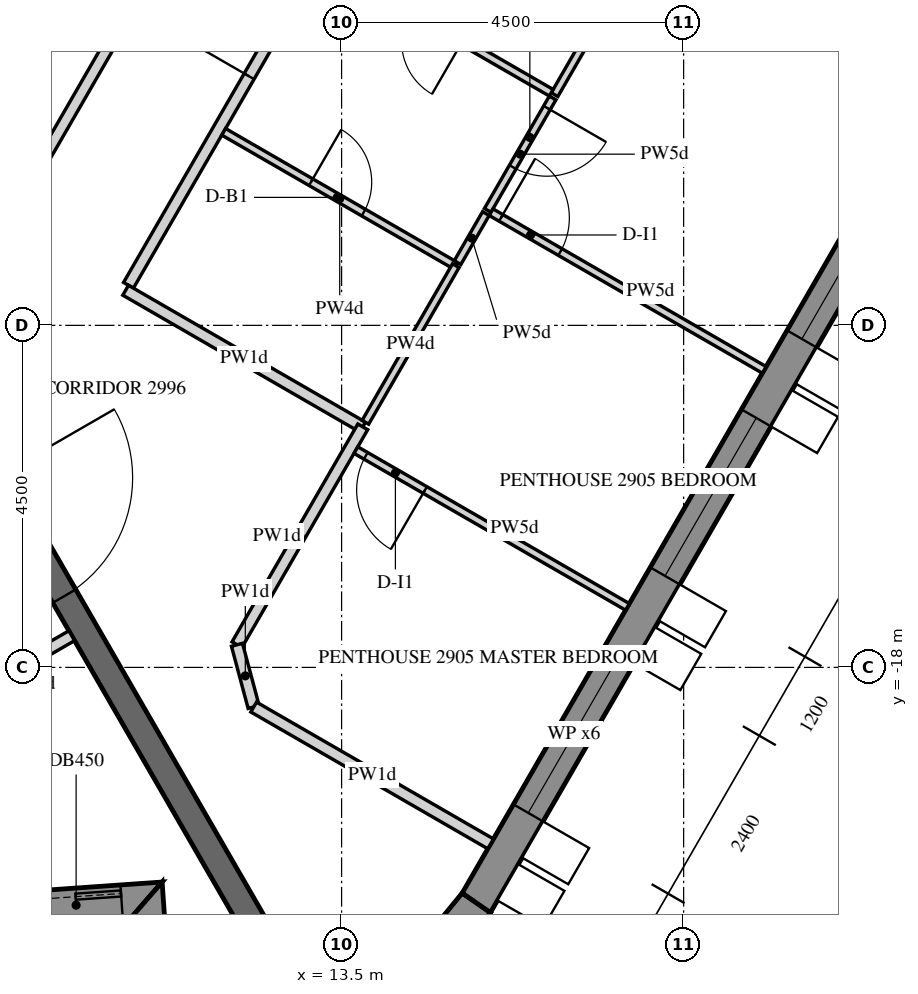
"""IFC4 building model, lengths in metres.
Left out: names, types, materials, properties, quantities, classifications, styles, units other than length and angle.
Written with IfcOpenShell. Run it as: python <this file> out.ifc"""

import sys

from ifc_helpers import new_model, si_unit, direction, frame, frame_2d, origin, place, context, subcontext, project, spatial, polyline, rectangle, outline, extrude, element, fill, save


model = new_model("IFC4")
c1 = context("Model", 3, precision=1e-05, world=origin(), true_north=direction((0.0, 1.0)))
c2 = subcontext(c1, "Body", "Model", "MODEL_VIEW")
j1 = project(units=[si_unit("LENGTHUNIT", "METRE"), si_unit("PLANEANGLEUNIT", "RADIAN")], contexts=[c1])
p1 = place(None, origin())
s1 = spatial("IfcSite", under=j1, at=p1, CompositionType="ELEMENT")
p2 = place(p1, origin())
s2 = spatial("IfcBuilding", under=s1, at=p2, CompositionType="ELEMENT")
p3 = place(p2, frame((0.0, 0.0, 369.0)))
s3 = spatial("IfcBuildingStorey", under=s2, at=p3, CompositionType="ELEMENT", Elevation=369.0)
p4 = place(p3, frame((-9.751, -22.51, -0.15), z_axis=(0.0, 0.0, 1.0), x_axis=(0.997564460173, 0.06975061147, 0.0)))
e1 = element("IfcWall", 1, at=p4, inside=s3, PredefinedType="SOLIDWALL", context=c2, shape_type="SweptSolid", body=[
    extrude(outline(polyline([(0.225, -0.225), (20.507, -0.225), (20.957, 0.225), (-0.225, 0.225), (0.225, -0.225)])), origin(), (0.0, 0.0, 1.0), 3.9),
])
p5 = place(p4, frame((0.325, 0.0, 1.05)))
e2 = element("IfcOpeningElement", 2, at=p5, cuts=e1, PredefinedType="OPENING", context=c2, shape_type="SweptSolid", body=[
    extrude(rectangle(XDim=0.9, YDim=1.5, at=frame_2d((0.45, 0.75))), frame((0.0, 0.235, 0.0), z_axis=(0.0, -1.0, 0.0), x_axis=(1.0, 0.0, 0.0)), (0.0, 0.0, 1.0), 0.47),
])
p6 = place(p4, frame((1.525, 0.0, 0.15)))
e3 = element("IfcOpeningElement", 3, at=p6, cuts=e1, PredefinedType="OPENING", context=c2, shape_type="SweptSolid", body=[
    extrude(rectangle(XDim=1.2, YDim=2.4, at=frame_2d((0.6, 1.2))), frame((0.0, 0.235, 0.0), z_axis=(0.0, -1.0, 0.0), x_axis=(1.0, 0.0, 0.0)), (0.0, 0.0, 1.0), 0.47),
])
p7 = place(p4, frame((3.766, 0.0, 1.05)))
e4 = element("IfcOpeningElement", 4, at=p7, cuts=e1, PredefinedType="OPENING", context=c2, shape_type="SweptSolid", body=[
    extrude(rectangle(XDim=0.9, YDim=1.5, at=frame_2d((0.45, 0.75))), frame((0.0, 0.235, 0.0), z_axis=(0.0, -1.0, 0.0), x_axis=(1.0, 0.0, 0.0)), (0.0, 0.0, 1.0), 0.47),
])
p8 = place(p4, frame((4.966, 0.0, 0.15)))
e5 = element("IfcOpeningElement", 5, at=p8, cuts=e1, PredefinedType="OPENING", context=c2, shape_type="SweptSolid", body=[
    extrude(rectangle(XDim=1.2, YDim=2.4, at=frame_2d((0.6, 1.2))), frame((0.0, 0.235, 0.0), z_axis=(0.0, -1.0, 0.0), x_axis=(1.0, 0.0, 0.0)), (0.0, 0.0, 1.0), 0.47),
])
p9 = place(p4, frame((7.366, 0.0, 1.05)))
e6 = element("IfcOpeningElement", 6, at=p9, cuts=e1, PredefinedType="OPENING", context=c2, shape_type="SweptSolid", body=[
    extrude(rectangle(XDim=0.9, YDim=1.5, at=frame_2d((0.45, 0.75))), frame((0.0, 0.235, 0.0), z_axis=(0.0, -1.0, 0.0), x_axis=(1.0, 0.0, 0.0)), (0.0, 0.0, 1.0), 0.47),
])
p10 = place(p4, frame((8.566, 0.0, 0.15)))
e7 = element("IfcOpeningElement", 7, at=p10, cuts=e1, PredefinedType="OPENING", context=c2, shape_type="SweptSolid", body=[
    extrude(rectangle(XDim=1.2, YDim=2.4, at=frame_2d((0.6, 1.2))), frame((0.0, 0.235, 0.0), z_axis=(0.0, -1.0, 0.0), x_axis=(1.0, 0.0, 0.0)), (0.0, 0.0, 1.0), 0.47),
])
p11 = place(p4, frame((10.966, 0.0, 1.05)))
e8 = element("IfcOpeningElement", 8, at=p11, cuts=e1, PredefinedType="OPENING", context=c2, shape_type="SweptSolid", body=[
    extrude(rectangle(XDim=0.9, YDim=1.5, at=frame_2d((0.45, 0.75))), frame((0.0, 0.235, 0.0), z_axis=(0.0, -1.0, 0.0), x_axis=(1.0, 0.0, 0.0)), (0.0, 0.0, 1.0), 0.47),
])
p12 = place(p4, frame((12.166, 0.0, 0.15)))
e9 = element("IfcOpeningElement", 9, at=p12, cuts=e1, PredefinedType="OPENING", context=c2, shape_type="SweptSolid", body=[
    extrude(rectangle(XDim=1.2, YDim=2.4, at=frame_2d((0.6, 1.2))), frame((0.0, 0.235, 0.0), z_axis=(0.0, -1.0, 0.0), x_axis=(1.0, 0.0, 0.0)), (0.0, 0.0, 1.0), 0.47),
])
p13 = place(p4, frame((14.566, 0.0, 1.05)))
e10 = element("IfcOpeningElement", 10, at=p13, cuts=e1, PredefinedType="OPENING", context=c2, shape_type="SweptSolid", body=[
    extrude(rectangle(XDim=0.9, YDim=1.5, at=frame_2d((0.45, 0.75))), frame((0.0, 0.235, 0.0), z_axis=(0.0, -1.0, 0.0), x_axis=(1.0, 0.0, 0.0)), (0.0, 0.0, 1.0), 0.47),
])
p14 = place(p4, frame((15.766, 0.0, 0.15)))
e11 = element("IfcOpeningElement", 11, at=p14, cuts=e1, PredefinedType="OPENING", context=c2, shape_type="SweptSolid", body=[
    extrude(rectangle(XDim=1.2, YDim=2.4, at=frame_2d((0.6, 1.2))), frame((0.0, 0.235, 0.0), z_axis=(0.0, -1.0, 0.0), x_axis=(1.0, 0.0, 0.0)), (0.0, 0.0, 1.0), 0.47),
])
p15 = place(p4, frame((18.007, 0.0, 1.05)))
e12 = element("IfcOpeningElement", 12, at=p15, cuts=e1, PredefinedType="OPENING", context=c2, shape_type="SweptSolid", body=[
    extrude(rectangle(XDim=0.9, YDim=1.5, at=frame_2d((0.45, 0.75))), frame((0.0, 0.235, 0.0), z_axis=(0.0, -1.0, 0.0), x_axis=(1.0, 0.0, 0.0)), (0.0, 0.0, 1.0), 0.47),
])
p16 = place(p4, frame((19.207, 0.0, 0.15)))
e13 = element("IfcOpeningElement", 13, at=p16, cuts=e1, PredefinedType="OPENING", context=c2, shape_type="SweptSolid", body=[
    extrude(rectangle(XDim=1.2, YDim=2.4, at=frame_2d((0.6, 1.2))), frame((0.0, 0.235, 0.0), z_axis=(0.0, -1.0, 0.0), x_axis=(1.0, 0.0, 0.0)), (0.0, 0.0, 1.0), 0.47),
])
p17 = place(p3, frame((10.93, -21.064, -0.15), z_axis=(0.0, 0.0, 1.0), x_axis=(0.069702791886, -0.99756780261, 0.0)))
e14 = element("IfcWall", 14, at=p17, inside=s3, PredefinedType="SOLIDWALL", context=c2, shape_type="SweptSolid", body=[
    extrude(outline(polyline([(0.225, -0.225), (2.225, -0.225), (1.775, 0.225), (-0.225, 0.225), (0.225, -0.225)])), origin(), (0.0, 0.0, 1.0), 3.9),
])
p18 = place(p3, frame((14.497, -22.044, -0.15), z_axis=(0.0, 0.0, 1.0), x_axis=(0.633867343651, 0.773441782329, 0.0)))
e15 = element("IfcWall", 15, at=p18, inside=s3, PredefinedType="SOLIDWALL", context=c2, shape_type="SweptSolid", body=[
    extrude(outline(polyline([(-0.037, -0.225), (1.243, -0.225), (1.206, 0.225), (0.037, 0.225), (-0.037, -0.225)])), origin(), (0.0, 0.0, 1.0), 3.9),
])
p19 = place(p3, frame((15.273, -21.097, -0.15), z_axis=(0.0, 0.0, 1.0), x_axis=(0.499997453958, 0.866026873738, 0.0)))
e16 = element("IfcWall", 16, at=p19, inside=s3, PredefinedType="SOLIDWALL", context=c2, shape_type="SweptSolid", body=[
    extrude(outline(polyline([(-0.018, -0.225), (23.152, -0.225), (23.11, 0.225), (0.018, 0.225), (-0.018, -0.225)])), origin(), (0.0, 0.0, 1.0), 3.9),
])
p20 = place(p19, frame((1.366, 0.0, 0.45)))
e17 = element("IfcOpeningElement", 17, at=p20, cuts=e16, PredefinedType="OPENING", context=c2, shape_type="SweptSolid", body=[
    extrude(rectangle(XDim=2.4, YDim=3.0, at=frame_2d((1.2, 1.5))), frame((0.0, 0.235, 0.0), z_axis=(0.0, -1.0, 0.0), x_axis=(1.0, 0.0, 0.0)), (0.0, 0.0, 1.0), 0.47),
])
p21 = place(p19, frame((4.966, 0.0, 0.45)))
e18 = element("IfcOpeningElement", 18, at=p21, cuts=e16, PredefinedType="OPENING", context=c2, shape_type="SweptSolid", body=[
    extrude(rectangle(XDim=2.4, YDim=3.0, at=frame_2d((1.2, 1.5))), frame((0.0, 0.235, 0.0), z_axis=(0.0, -1.0, 0.0), x_axis=(1.0, 0.0, 0.0)), (0.0, 0.0, 1.0), 0.47),
])
p22 = place(p19, frame((8.566, 0.0, 0.45)))
e19 = element("IfcOpeningElement", 19, at=p22, cuts=e16, PredefinedType="OPENING", context=c2, shape_type="SweptSolid", body=[
    extrude(rectangle(XDim=2.4, YDim=3.0, at=frame_2d((1.2, 1.5))), frame((0.0, 0.235, 0.0), z_axis=(0.0, -1.0, 0.0), x_axis=(1.0, 0.0, 0.0)), (0.0, 0.0, 1.0), 0.47),
])
p23 = place(p19, frame((12.166, 0.0, 0.45)))
e20 = element("IfcOpeningElement", 20, at=p23, cuts=e16, PredefinedType="OPENING", context=c2, shape_type="SweptSolid", body=[
    extrude(rectangle(XDim=2.4, YDim=3.0, at=frame_2d((1.2, 1.5))), frame((0.0, 0.235, 0.0), z_axis=(0.0, -1.0, 0.0), x_axis=(1.0, 0.0, 0.0)), (0.0, 0.0, 1.0), 0.47),
])
p24 = place(p19, frame((15.766, 0.0, 0.45)))
e21 = element("IfcOpeningElement", 21, at=p24, cuts=e16, PredefinedType="OPENING", context=c2, shape_type="SweptSolid", body=[
    extrude(rectangle(XDim=2.4, YDim=3.0, at=frame_2d((1.2, 1.5))), frame((0.0, 0.235, 0.0), z_axis=(0.0, -1.0, 0.0), x_axis=(1.0, 0.0, 0.0)), (0.0, 0.0, 1.0), 0.47),
])
p25 = place(p19, frame((19.366, 0.0, 0.45)))
e22 = element("IfcOpeningElement", 22, at=p25, cuts=e16, PredefinedType="OPENING", context=c2, shape_type="SweptSolid", body=[
    extrude(rectangle(XDim=2.4, YDim=3.0, at=frame_2d((1.2, 1.5))), frame((0.0, 0.235, 0.0), z_axis=(0.0, -1.0, 0.0), x_axis=(1.0, 0.0, 0.0)), (0.0, 0.0, 1.0), 0.47),
])
p26 = place(p3, frame((5.673, -9.825, -0.15), z_axis=(0.0, 0.0, 1.0), x_axis=(0.499995046907, 0.866028263435, 0.0)))
e23 = element("IfcWall", 23, at=p26, inside=s3, PredefinedType="SHEAR", context=c2, shape_type="SweptSolid", body=[
    extrude(outline(polyline([(-0.101, -0.175), (11.446, -0.175), (11.244, 0.175), (0.101, 0.175), (-0.101, -0.175)])), origin(), (0.0, 0.0, 1.0), 3.9),
])
p27 = place(p26, frame((4.801, 0.0, 0.15)))
e24 = element("IfcOpeningElement", 24, at=p27, cuts=e23, PredefinedType="OPENING", context=c2, shape_type="SweptSolid", body=[
    extrude(rectangle(XDim=1.8, YDim=2.4, at=frame_2d((0.9, 1.2))), frame((0.0, 0.185, 0.0), z_axis=(0.0, -1.0, 0.0), x_axis=(1.0, 0.0, 0.0)), (0.0, 0.0, 1.0), 0.37),
])
p28 = place(p3, frame((5.773, -10.0, -0.15), z_axis=(0.0, 0.0, 1.0), x_axis=(0.500007911273, -0.866020836161, 0.0)))
e25 = element("IfcWall", 25, at=p28, inside=s3, PredefinedType="SHEAR", context=c2, shape_type="SweptSolid", body=[
    extrude(rectangle(XDim=14.51, YDim=0.35, at=frame_2d((7.255, 0.0))), origin(), (0.0, 0.0, 1.0), 3.9),
])
p29 = place(p28, frame((6.355, 0.0, 0.15)))
e26 = element("IfcOpeningElement", 26, at=p29, cuts=e25, PredefinedType="OPENING", context=c2, shape_type="SweptSolid", body=[
    extrude(rectangle(XDim=1.8, YDim=2.4, at=frame_2d((0.9, 1.2))), frame((0.0, 0.185, 0.0), z_axis=(0.0, -1.0, 0.0), x_axis=(1.0, 0.0, 0.0)), (0.0, 0.0, 1.0), 0.37),
])
p30 = place(p3, frame((8.456, -18.446, 0.0), z_axis=(0.0, 0.0, 1.0), x_axis=(0.866013532718, 0.500020560727, 0.0)))
e27 = element("IfcWall", 27, at=p30, inside=s3, PredefinedType="PARTITIONING", context=c2, shape_type="SweptSolid", body=[
    extrude(rectangle(XDim=1.725, YDim=0.15, at=frame_2d((0.863, 0.0))), origin(), (0.0, 0.0, 1.0), 2.47),
])
p31 = place(p3, frame((10.697, -12.973, 0.0), z_axis=(0.0, 0.0, 1.0), x_axis=(0.499991115059, 0.866030533446, 0.0)))
e28 = element("IfcWall", 28, at=p31, inside=s3, PredefinedType="PARTITIONING", context=c2, shape_type="SweptSolid", body=[
    extrude(rectangle(XDim=13.504, YDim=0.15, at=frame_2d((6.752, 0.0))), origin(), (0.0, 0.0, 1.0), 2.47),
])
p32 = place(p31, frame((3.175, 0.0, 0.0)))
e29 = element("IfcOpeningElement", 29, at=p32, cuts=e28, PredefinedType="OPENING", context=c2, shape_type="SweptSolid", body=[
    extrude(rectangle(XDim=1.0, YDim=2.1, at=frame_2d((0.5, 1.05))), frame((0.0, 0.085, 0.0), z_axis=(0.0, -1.0, 0.0), x_axis=(1.0, 0.0, 0.0)), (0.0, 0.0, 1.0), 0.17),
])
p33 = place(p3, frame((13.777, -14.838, 0.0), z_axis=(0.0, 0.0, 1.0), x_axis=(-0.866047807691, 0.499961193289, 0.0)))
e30 = element("IfcWall", 30, at=p33, inside=s3, PredefinedType="PARTITIONING", context=c2, shape_type="SweptSolid", body=[
    extrude(rectangle(XDim=3.6, YDim=0.15, at=frame_2d((1.8, 0.0))), origin(), (0.0, 0.0, 1.0), 2.47),
])
p34 = place(p3, frame((12.124, -17.701, 0.0), z_axis=(0.0, 0.0, 1.0), x_axis=(0.500018282537, 0.866014848099, 0.0)))
e31 = element("IfcWall", 31, at=p34, inside=s3, PredefinedType="PARTITIONING", context=c2, shape_type="SweptSolid", body=[
    extrude(rectangle(XDim=3.31, YDim=0.15, at=frame_2d((1.655, 0.0))), origin(), (0.0, 0.0, 1.0), 2.47),
])
p35 = place(p3, frame((12.343, -18.521, 0.0), z_axis=(0.0, 0.0, 1.0), x_axis=(-0.258846545656, 0.965918457118, 0.0)))
e32 = element("IfcWall", 32, at=p35, inside=s3, PredefinedType="PARTITIONING", context=c2, shape_type="SweptSolid", body=[
    extrude(rectangle(XDim=0.847, YDim=0.15, at=frame_2d((0.423, 0.0))), origin(), (0.0, 0.0, 1.0), 2.47),
])
p36 = place(p3, frame((15.461, -20.321, 0.0), z_axis=(0.0, 0.0, 1.0), x_axis=(-0.866030854095, 0.499990559667, 0.0)))
e33 = element("IfcWall", 33, at=p36, inside=s3, PredefinedType="PARTITIONING", context=c2, shape_type="SweptSolid", body=[
    extrude(rectangle(XDim=3.6, YDim=0.15, at=frame_2d((1.8, 0.0))), origin(), (0.0, 0.0, 1.0), 2.47),
])
p37 = place(p3, frame((11.533, -7.924, 0.0), z_axis=(0.0, 0.0, 1.0), x_axis=(-0.500001804394, -0.866024362014, 0.0)))
e34 = element("IfcWall", 34, at=p37, inside=s3, PredefinedType="PARTITIONING", context=c2, shape_type="SweptSolid", body=[
    extrude(rectangle(XDim=3.909, YDim=0.15, at=frame_2d((1.954, 0.0))), origin(), (0.0, 0.0, 1.0), 2.47),
])
p38 = place(p3, frame((16.277, -10.508, 0.0), z_axis=(0.0, 0.0, 1.0), x_axis=(-0.500027584368, -0.866009477356, 0.0)))
e35 = element("IfcWall", 35, at=p38, inside=s3, PredefinedType="PARTITIONING", context=c2, shape_type="SweptSolid", body=[
    extrude(rectangle(XDim=1.708, YDim=0.1, at=frame_2d((0.854, 0.0))), origin(), (0.0, 0.0, 1.0), 2.47),
])
p39 = place(p38, frame((0.15, 0.0, 0.0)))
e36 = element("IfcOpeningElement", 36, at=p39, cuts=e35, PredefinedType="OPENING", context=c2, shape_type="SweptSolid", body=[
    extrude(rectangle(XDim=0.9, YDim=2.1, at=frame_2d((0.45, 1.05))), frame((0.0, 0.06, 0.0), z_axis=(0.0, -1.0, 0.0), x_axis=(1.0, 0.0, 0.0)), (0.0, 0.0, 1.0), 0.12),
])
p40 = place(p3, frame((15.467, -12.011, 0.0), z_axis=(0.0, 0.0, 1.0), x_axis=(0.86602981871, -0.499992353047, 0.0)))
e37 = element("IfcWall", 37, at=p40, inside=s3, PredefinedType="PARTITIONING", context=c2, shape_type="SweptSolid", body=[
    extrude(rectangle(XDim=4.15, YDim=0.1, at=frame_2d((2.075, 0.0))), origin(), (0.0, 0.0, 1.0), 2.47),
])
p41 = place(p40, frame((0.15, 0.0, 0.0)))
e38 = element("IfcOpeningElement", 38, at=p41, cuts=e37, PredefinedType="OPENING", context=c2, shape_type="SweptSolid", body=[
    extrude(rectangle(XDim=0.9, YDim=2.1, at=frame_2d((0.45, 1.05))), frame((0.0, 0.06, 0.0), z_axis=(0.0, -1.0, 0.0), x_axis=(1.0, 0.0, 0.0)), (0.0, 0.0, 1.0), 0.12),
])
p42 = place(p3, frame((17.527, -8.343, 0.0), z_axis=(0.0, 0.0, 1.0), x_axis=(-0.500018594424, -0.866014668023, 0.0)))
e39 = element("IfcWall", 39, at=p42, inside=s3, PredefinedType="PARTITIONING", context=c2, shape_type="SweptSolid", body=[
    extrude(rectangle(XDim=2.45, YDim=0.1, at=frame_2d((1.225, 0.0))), origin(), (0.0, 0.0, 1.0), 2.47),
])
p43 = place(p3, frame((11.949, -10.954, 0.0), z_axis=(0.0, 0.0, 1.0), x_axis=(0.866001044215, -0.500042189638, 0.0)))
e40 = element("IfcWall", 40, at=p43, inside=s3, PredefinedType="PARTITIONING", context=c2, shape_type="SweptSolid", body=[
    extrude(rectangle(XDim=3.525, YDim=0.1, at=frame_2d((1.763, 0.0))), origin(), (0.0, 0.0, 1.0), 2.47),
])
p44 = place(p43, frame((1.325, 0.0, 0.0)))
e41 = element("IfcOpeningElement", 41, at=p44, cuts=e40, PredefinedType="OPENING", context=c2, shape_type="SweptSolid", body=[
    extrude(rectangle(XDim=0.8, YDim=2.1, at=frame_2d((0.4, 1.05))), frame((0.0, 0.06, 0.0), z_axis=(0.0, -1.0, 0.0), x_axis=(1.0, 0.0, 0.0)), (0.0, 0.0, 1.0), 0.12),
])
p45 = place(p3, frame((15.026, -12.675, 0.0), z_axis=(0.0, 0.0, 1.0), x_axis=(0.500119347963, 0.86595648724, 0.0)))
e42 = element("IfcWall", 42, at=p45, inside=s3, PredefinedType="PARTITIONING", context=c2, shape_type="SweptSolid", body=[
    extrude(rectangle(XDim=0.745, YDim=0.1, at=frame_2d((0.373, 0.0))), origin(), (0.0, 0.0, 1.0), 2.47),
])
p46 = place(p3, frame((16.258, -10.44, 0.0), z_axis=(0.0, 0.0, 1.0), x_axis=(-0.866055725969, 0.499947476758, 0.0)))
e43 = element("IfcWall", 43, at=p46, inside=s3, PredefinedType="PARTITIONING", context=c2, shape_type="SweptSolid", body=[
    extrude(rectangle(XDim=3.475, YDim=0.1, at=frame_2d((1.737, 0.0))), origin(), (0.0, 0.0, 1.0), 2.47),
])
p47 = place(p46, frame((1.35, 0.0, 0.0)))
e44 = element("IfcOpeningElement", 44, at=p47, cuts=e43, PredefinedType="OPENING", context=c2, shape_type="SweptSolid", body=[
    extrude(rectangle(XDim=0.8, YDim=2.1, at=frame_2d((0.4, 1.05))), frame((0.0, 0.06, 0.0), z_axis=(0.0, -1.0, 0.0), x_axis=(1.0, 0.0, 0.0)), (0.0, 0.0, 1.0), 0.12),
])
p48 = place(p3, frame((13.813, -14.775, 0.0), z_axis=(0.0, 0.0, 1.0), x_axis=(0.500101476366, 0.86596680845, 0.0)))
e45 = element("IfcWall", 45, at=p48, inside=s3, PredefinedType="PARTITIONING", context=c2, shape_type="SweptSolid", body=[
    extrude(rectangle(XDim=2.379, YDim=0.1, at=frame_2d((1.189, 0.0))), origin(), (0.0, 0.0, 1.0), 2.47),
])
p49 = place(p3, frame((17.261, -17.204, 0.0), z_axis=(0.0, 0.0, 1.0), x_axis=(-0.866034795751, 0.499983732284, 0.0)))
e46 = element("IfcWall", 46, at=p49, inside=s3, PredefinedType="PARTITIONING", context=c2, shape_type="SweptSolid", body=[
    extrude(rectangle(XDim=4.125, YDim=0.1, at=frame_2d((2.062, 0.0))), origin(), (0.0, 0.0, 1.0), 2.47),
])
p50 = place(p49, frame((3.075, 0.0, 0.0)))
e47 = element("IfcOpeningElement", 47, at=p50, cuts=e46, PredefinedType="OPENING", context=c2, shape_type="SweptSolid", body=[
    extrude(rectangle(XDim=0.9, YDim=2.1, at=frame_2d((0.45, 1.05))), frame((0.0, 0.06, 0.0), z_axis=(0.0, -1.0, 0.0), x_axis=(1.0, 0.0, 0.0)), (0.0, 0.0, 1.0), 0.12),
])
p51 = place(p16, frame((0.0, 0.15, 0.0)))
e48 = element("IfcDoor", 48, at=p51, inside=s3, OperationType="SLIDING_TO_LEFT", PredefinedType="DOOR", context=c2, shape_type="SweptSolid", body=[
    extrude(rectangle(XDim=1.2, YDim=2.4, at=frame_2d((0.6, 1.2))), frame((0.0, 0.025, 0.0), z_axis=(0.0, -1.0, 0.0), x_axis=(1.0, 0.0, 0.0)), (0.0, 0.0, 1.0), 0.05),
])
fill(e13, e48)
p52 = place(p20, frame((0.0, 0.155, 0.0)))
e49 = element("IfcWindow", 49, at=p52, inside=s3, PartitioningType="DOUBLE_PANEL_VERTICAL", PredefinedType="WINDOW", context=c2, shape_type="SweptSolid", body=[
    extrude(rectangle(XDim=2.4, YDim=3.0, at=frame_2d((1.2, 1.5))), frame((0.0, 0.03, 0.0), z_axis=(0.0, -1.0, 0.0), x_axis=(1.0, 0.0, 0.0)), (0.0, 0.0, 1.0), 0.06),
])
fill(e17, e49)
p53 = place(p21, frame((0.0, 0.155, 0.0)))
e50 = element("IfcWindow", 50, at=p53, inside=s3, PartitioningType="DOUBLE_PANEL_VERTICAL", PredefinedType="WINDOW", context=c2, shape_type="SweptSolid", body=[
    extrude(rectangle(XDim=2.4, YDim=3.0, at=frame_2d((1.2, 1.5))), frame((0.0, 0.03, 0.0), z_axis=(0.0, -1.0, 0.0), x_axis=(1.0, 0.0, 0.0)), (0.0, 0.0, 1.0), 0.06),
])
fill(e18, e50)
p54 = place(p22, frame((0.0, 0.155, 0.0)))
e51 = element("IfcWindow", 51, at=p54, inside=s3, PartitioningType="DOUBLE_PANEL_VERTICAL", PredefinedType="WINDOW", context=c2, shape_type="SweptSolid", body=[
    extrude(rectangle(XDim=2.4, YDim=3.0, at=frame_2d((1.2, 1.5))), frame((0.0, 0.03, 0.0), z_axis=(0.0, -1.0, 0.0), x_axis=(1.0, 0.0, 0.0)), (0.0, 0.0, 1.0), 0.06),
])
fill(e19, e51)
p55 = place(p29, origin())
e52 = element("IfcDoor", 52, at=p55, inside=s3, OperationType="DOUBLE_DOOR_SINGLE_SWING", PredefinedType="DOOR", context=c2, shape_type="SweptSolid", body=[
    extrude(rectangle(XDim=1.8, YDim=2.4, at=frame_2d((0.9, 1.2))), frame((0.0, 0.025, 0.0), z_axis=(0.0, -1.0, 0.0), x_axis=(1.0, 0.0, 0.0)), (0.0, 0.0, 1.0), 0.05),
])
fill(e26, e52)
p56 = place(p32, origin())
e53 = element("IfcDoor", 53, at=p56, inside=s3, OperationType="SINGLE_SWING_LEFT", PredefinedType="DOOR", context=c2, shape_type="SweptSolid", body=[
    extrude(rectangle(XDim=1.0, YDim=2.1, at=frame_2d((0.5, 1.05))), frame((0.0, 0.025, 0.0), z_axis=(0.0, -1.0, 0.0), x_axis=(1.0, 0.0, 0.0)), (0.0, 0.0, 1.0), 0.05),
])
fill(e29, e53)
p57 = place(p44, origin())
e54 = element("IfcDoor", 54, at=p57, inside=s3, OperationType="SINGLE_SWING_RIGHT", PredefinedType="DOOR", context=c2, shape_type="SweptSolid", body=[
    extrude(rectangle(XDim=0.8, YDim=2.1, at=frame_2d((0.4, 1.05))), frame((0.0, 0.025, 0.0), z_axis=(0.0, -1.0, 0.0), x_axis=(1.0, 0.0, 0.0)), (0.0, 0.0, 1.0), 0.05),
])
fill(e41, e54)
p58 = place(p39, origin())
e55 = element("IfcDoor", 55, at=p58, inside=s3, OperationType="SINGLE_SWING_RIGHT", PredefinedType="DOOR", context=c2, shape_type="SweptSolid", body=[
    extrude(rectangle(XDim=0.9, YDim=2.1, at=frame_2d((0.45, 1.05))), frame((0.0, 0.025, 0.0), z_axis=(0.0, -1.0, 0.0), x_axis=(1.0, 0.0, 0.0)), (0.0, 0.0, 1.0), 0.05),
])
fill(e36, e55)
p59 = place(p50, origin())
e56 = element("IfcDoor", 56, at=p59, inside=s3, OperationType="SINGLE_SWING_RIGHT", PredefinedType="DOOR", context=c2, shape_type="SweptSolid", body=[
    extrude(rectangle(XDim=0.9, YDim=2.1, at=frame_2d((0.45, 1.05))), frame((0.0, 0.025, 0.0), z_axis=(0.0, -1.0, 0.0), x_axis=(1.0, 0.0, 0.0)), (0.0, 0.0, 1.0), 0.05),
])
fill(e47, e56)
p60 = place(p41, origin())
e57 = element("IfcDoor", 57, at=p60, inside=s3, OperationType="SINGLE_SWING_RIGHT", PredefinedType="DOOR", context=c2, shape_type="SweptSolid", body=[
    extrude(rectangle(XDim=0.9, YDim=2.1, at=frame_2d((0.45, 1.05))), frame((0.0, 0.025, 0.0), z_axis=(0.0, -1.0, 0.0), x_axis=(1.0, 0.0, 0.0)), (0.0, 0.0, 1.0), 0.05),
])
fill(e38, e57)
save(model, sys.argv[1])
